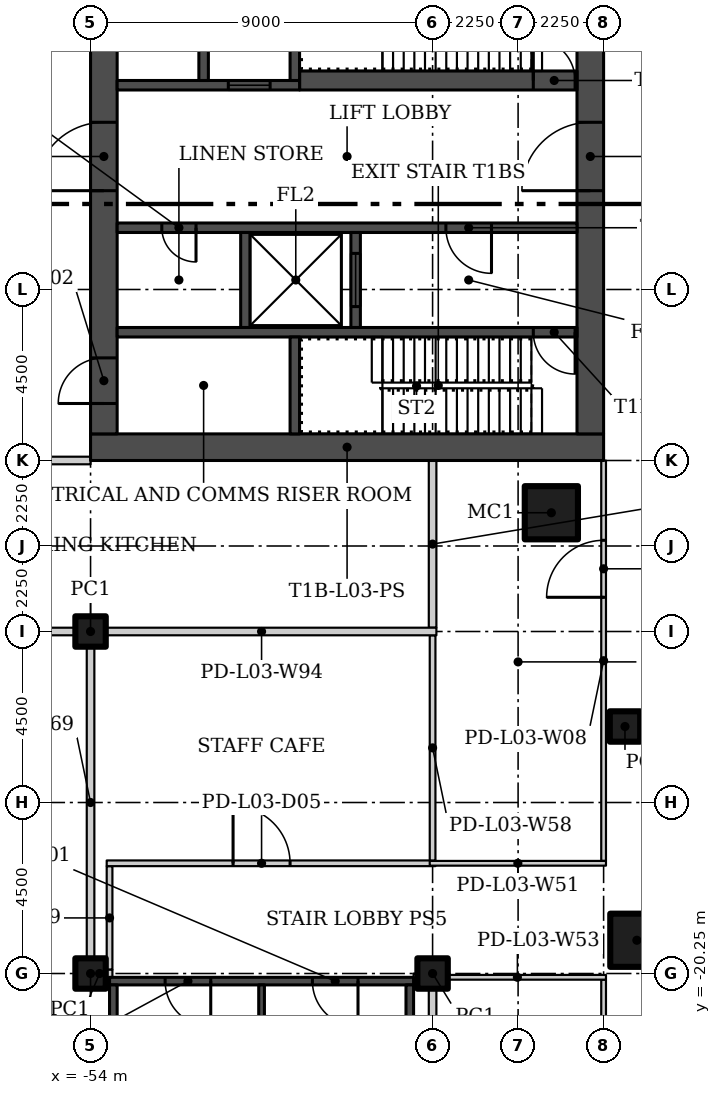
"""IFC4 building model, lengths in metres.
Left out: names, types, materials, properties, quantities, classifications, styles, units other than length and angle.
Written with IfcOpenShell. Run it as: python <this file> out.ifc"""

import sys

from ifc_helpers import new_model, si_unit, direction, frame, frame_2d, origin, origin_2d, place, context, subcontext, project, spatial, rectangle, hollow_rectangle, extrude, element, fill, save


model = new_model("IFC4")
c1 = context("Model", 3, precision=1e-05, world=origin(), true_north=direction((0.0, 1.0)))
c2 = subcontext(c1, "Body", "Model", "MODEL_VIEW")
j1 = project(units=[si_unit("LENGTHUNIT", "METRE"), si_unit("PLANEANGLEUNIT", "RADIAN")], contexts=[c1])
p1 = place(None, origin())
s1 = spatial("IfcSite", under=j1, at=p1, CompositionType="ELEMENT")
p2 = place(p1, origin())
s2 = spatial("IfcBuilding", under=s1, at=p2, CompositionType="ELEMENT")
p3 = place(p2, frame((0.0, 0.0, 18.5)))
s3 = spatial("IfcBuildingStorey", under=s2, at=p3, CompositionType="ELEMENT", Elevation=18.5)
p4 = place(p3, frame((-41.875, -8.125, 0.0)))
e1 = element("IfcColumn", 1, at=p4, inside=s3, PredefinedType="COLUMN", context=c2, shape_type="SweptSolid", body=[
    extrude(hollow_rectangle(XDim=1.4, YDim=1.4, WallThickness=0.06, at=origin_2d()), origin(), (0.0, 0.0, 1.0), 4.6),
])
p5 = place(p3, frame((-39.938, -13.75, 0.0)))
e2 = element("IfcColumn", 2, at=p5, inside=s3, PredefinedType="COLUMN", context=c2, shape_type="SweptSolid", body=[
    extrude(hollow_rectangle(XDim=0.8, YDim=0.8, WallThickness=0.03, at=origin_2d()), origin(), (0.0, 0.0, 1.0), 4.6),
])
p6 = place(p3, frame((-39.625, -19.375, 0.0)))
e3 = element("IfcColumn", 3, at=p6, inside=s3, PredefinedType="COLUMN", context=c2, shape_type="SweptSolid", body=[
    extrude(hollow_rectangle(XDim=1.4, YDim=1.4, WallThickness=0.06, at=origin_2d()), origin(), (0.0, 0.0, 1.0), 4.6),
])
for number, where in (
    (4, (-54.0, -20.25, 0.0)),
    (5, (-54.0, -11.25, 0.0)),
    (6, (-45.0, -20.25, 0.0)),
):
    element("IfcColumn", number, at=place(p3, frame(where)), inside=s3, PredefinedType="COLUMN", context=c2, shape_type="SweptSolid", body=[
        extrude(hollow_rectangle(XDim=0.8, YDim=0.8, WallThickness=0.03, at=origin_2d()), origin(), (0.0, 0.0, 1.0), 4.6),
    ])
p7 = place(p3, frame((-40.5, -29.175, 0.0), z_axis=(0.0, 0.0, 1.0), x_axis=(0.0, 1.0, 0.0)))
e7 = element("IfcWall", 7, at=p7, inside=s3, PredefinedType="PARTITIONING", context=c2, shape_type="SweptSolid", body=[
    extrude(rectangle(XDim=8.763, YDim=0.125, at=frame_2d((4.381, 0.0))), origin(), (0.0, 0.0, 1.0), 4.6),
])
p8 = place(p7, frame((3.625, 0.0, 0.0)))
e8 = element("IfcOpeningElement", 8, at=p8, cuts=e7, PredefinedType="OPENING", context=c2, shape_type="SweptSolid", body=[
    extrude(rectangle(XDim=0.9, YDim=2.1, at=frame_2d((0.45, 1.05))), frame((0.0, 0.073, 0.0), z_axis=(0.0, -1.0, 0.0), x_axis=(1.0, 0.0, 0.0)), (0.0, 0.0, 1.0), 0.145),
])
p9 = place(p3, frame((-40.5, -17.287, 0.0), z_axis=(0.0, 0.0, 1.0), x_axis=(0.0, 1.0, 0.0)))
e9 = element("IfcWall", 9, at=p9, inside=s3, PredefinedType="PARTITIONING", context=c2, shape_type="SweptSolid", body=[
    extrude(rectangle(XDim=10.537, YDim=0.125, at=frame_2d((5.269, 0.0))), origin(), (0.0, 0.0, 1.0), 4.6),
])
p10 = place(p9, frame((6.937, 0.0, 0.0)))
e10 = element("IfcOpeningElement", 10, at=p10, cuts=e9, PredefinedType="OPENING", context=c2, shape_type="SweptSolid", body=[
    extrude(rectangle(XDim=1.5, YDim=2.1, at=frame_2d((0.75, 1.05))), frame((0.0, 0.073, 0.0), z_axis=(0.0, -1.0, 0.0), x_axis=(1.0, 0.0, 0.0)), (0.0, 0.0, 1.0), 0.145),
])
p11 = place(p3, frame((-54.0, -6.75, 0.0), z_axis=(0.0, 0.0, 1.0), x_axis=(-1.0, 0.0, 0.0)))
e11 = element("IfcWall", 11, at=p11, inside=s3, PredefinedType="PARTITIONING", context=c2, shape_type="SweptSolid", body=[
    extrude(rectangle(XDim=11.155, YDim=0.2, at=frame_2d((5.578, 0.0))), origin(), (0.0, 0.0, 1.0), 4.6),
])
p12 = place(p11, frame((4.35, 0.0, 0.0)))
e12 = element("IfcOpeningElement", 12, at=p12, cuts=e11, PredefinedType="OPENING", context=c2, shape_type="SweptSolid", body=[
    extrude(rectangle(XDim=1.5, YDim=2.4, at=frame_2d((0.75, 1.2))), frame((0.0, 0.11, 0.0), z_axis=(0.0, -1.0, 0.0), x_axis=(1.0, 0.0, 0.0)), (0.0, 0.0, 1.0), 0.22),
])
p13 = place(p11, frame((9.375, 0.0, 0.0)))
e13 = element("IfcOpeningElement", 13, at=p13, cuts=e11, PredefinedType="OPENING", context=c2, shape_type="SweptSolid", body=[
    extrude(rectangle(XDim=1.5, YDim=2.4, at=frame_2d((0.75, 1.2))), frame((0.0, 0.11, 0.0), z_axis=(0.0, -1.0, 0.0), x_axis=(1.0, 0.0, 0.0)), (0.0, 0.0, 1.0), 0.22),
])
p14 = place(p3, frame((-44.9, -20.35, 0.0), z_axis=(0.0, 0.0, 1.0), x_axis=(-1.0, 0.0, 0.0)))
e14 = element("IfcWall", 14, at=p14, inside=s3, PredefinedType="PARTITIONING", context=c2, shape_type="SweptSolid", body=[
    extrude(rectangle(XDim=0.6, YDim=0.2, at=frame_2d((0.3, 0.0))), origin(), (0.0, 0.0, 1.0), 4.6),
])
p15 = place(p3, frame((-53.5, -20.15, 0.0), z_axis=(0.0, 0.0, 1.0), x_axis=(0.0, 1.0, 0.0)))
e15 = element("IfcWall", 15, at=p15, inside=s3, PredefinedType="PARTITIONING", context=c2, shape_type="SweptSolid", body=[
    extrude(rectangle(XDim=2.725, YDim=0.15, at=frame_2d((1.363, 0.0))), origin(), (0.0, 0.0, 1.0), 4.6),
])
p16 = place(p3, frame((-53.575, -17.35, 0.0)))
e16 = element("IfcWall", 16, at=p16, inside=s3, PredefinedType="PARTITIONING", context=c2, shape_type="SweptSolid", body=[
    extrude(rectangle(XDim=8.65, YDim=0.15, at=frame_2d((4.325, 0.0))), origin(), (0.0, 0.0, 1.0), 4.6),
])
p17 = place(p16, frame((3.325, 0.0, 0.0)))
e17 = element("IfcOpeningElement", 17, at=p17, cuts=e16, PredefinedType="OPENING", context=c2, shape_type="SweptSolid", body=[
    extrude(rectangle(XDim=1.5, YDim=2.1, at=frame_2d((0.75, 1.05))), frame((0.0, 0.085, 0.0), z_axis=(0.0, -1.0, 0.0), x_axis=(1.0, 0.0, 0.0)), (0.0, 0.0, 1.0), 0.17),
])
p18 = place(p3, frame((-45.075, -17.35, 0.0)))
e18 = element("IfcWall", 18, at=p18, inside=s3, PredefinedType="PARTITIONING", context=c2, shape_type="SweptSolid", body=[
    extrude(rectangle(XDim=4.637, YDim=0.125, at=frame_2d((2.319, 0.0))), origin(), (0.0, 0.0, 1.0), 4.6),
])
p19 = place(p3, frame((-40.438, -20.35, 0.0), z_axis=(0.0, 0.0, 1.0), x_axis=(-1.0, 0.0, 0.0)))
e19 = element("IfcWall", 19, at=p19, inside=s3, PredefinedType="PARTITIONING", context=c2, shape_type="SweptSolid", body=[
    extrude(rectangle(XDim=4.663, YDim=0.125, at=frame_2d((2.331, 0.0))), origin(), (0.0, 0.0, 1.0), 4.6),
])
p20 = place(p3, frame((-45.0, -17.275, 0.0), z_axis=(0.0, 0.0, 1.0), x_axis=(0.0, 1.0, 0.0)))
e20 = element("IfcWall", 20, at=p20, inside=s3, PredefinedType="PARTITIONING", context=c2, shape_type="SweptSolid", body=[
    extrude(rectangle(XDim=5.925, YDim=0.15, at=frame_2d((2.962, 0.0))), origin(), (0.0, 0.0, 1.0), 4.6),
])
p21 = place(p3, frame((-53.9, -11.25, 0.0), z_axis=(0.0, 0.0, 1.0), x_axis=(-1.0, 0.0, 0.0)))
e21 = element("IfcWall", 21, at=p21, inside=s3, PredefinedType="PARTITIONING", context=c2, shape_type="SweptSolid", body=[
    extrude(rectangle(XDim=9.2, YDim=0.2, at=frame_2d((4.6, 0.0))), origin(), (0.0, 0.0, 1.0), 4.6),
])
p22 = place(p3, frame((-54.0, -20.15, 0.0), z_axis=(0.0, 0.0, 1.0), x_axis=(0.0, 1.0, 0.0)))
e22 = element("IfcWall", 22, at=p22, inside=s3, PredefinedType="PARTITIONING", context=c2, shape_type="SweptSolid", body=[
    extrude(rectangle(XDim=8.8, YDim=0.2, at=frame_2d((4.4, 0.0))), origin(), (0.0, 0.0, 1.0), 4.6),
])
p23 = place(p3, frame((-53.425, -20.25, 0.0), z_axis=(0.0, 0.0, 1.0), x_axis=(-1.0, 0.0, 0.0)))
e23 = element("IfcWall", 23, at=p23, inside=s3, PredefinedType="PARTITIONING", context=c2, shape_type="SweptSolid", body=[
    extrude(rectangle(XDim=0.675, YDim=0.2, at=frame_2d((0.337, 0.0))), origin(), (0.0, 0.0, 1.0), 4.6),
])
p24 = place(p3, frame((-45.0, -29.15, 0.0), z_axis=(0.0, 0.0, 1.0), x_axis=(0.0, 1.0, 0.0)))
e24 = element("IfcWall", 24, at=p24, inside=s3, PredefinedType="PARTITIONING", context=c2, shape_type="SweptSolid", body=[
    extrude(rectangle(XDim=8.7, YDim=0.2, at=frame_2d((4.35, 0.0))), origin(), (0.0, 0.0, 1.0), 4.6),
])
p25 = place(p3, frame((-45.0, -11.15, 0.0), z_axis=(0.0, 0.0, 1.0), x_axis=(0.0, 1.0, 0.0)))
e25 = element("IfcWall", 25, at=p25, inside=s3, PredefinedType="PARTITIONING", context=c2, shape_type="SweptSolid", body=[
    extrude(rectangle(XDim=4.4, YDim=0.2, at=frame_2d((2.2, 0.0))), origin(), (0.0, 0.0, 1.0), 4.6),
])
p26 = place(p3, frame((-54.1, -11.25, 0.0)))
e26 = element("IfcWall", 26, at=p26, inside=s3, PredefinedType="PARTITIONING", context=c2, shape_type="SweptSolid", body=[
    extrude(rectangle(XDim=9.2, YDim=0.2, at=frame_2d((4.6, 0.0))), origin(), (0.0, 0.0, 1.0), 4.6),
])
p27 = place(p3, frame((-40.5, -6.4, 0.0), z_axis=(0.0, 0.0, 1.0), x_axis=(-1.0, 0.0, 0.0)))
e27 = element("IfcWall", 27, at=p27, inside=s3, PredefinedType="SHEAR", context=c2, shape_type="SweptSolid", body=[
    extrude(rectangle(XDim=13.5, YDim=0.7, at=frame_2d((6.75, 0.0))), origin(), (0.0, 0.0, 1.0), 4.6),
])
p28 = place(p3, frame((-40.85, -6.05, 0.0), z_axis=(0.0, 0.0, 1.0), x_axis=(0.0, 1.0, 0.0)))
e28 = element("IfcWall", 28, at=p28, inside=s3, PredefinedType="SHEAR", context=c2, shape_type="SweptSolid", body=[
    extrude(rectangle(XDim=12.1, YDim=0.7, at=frame_2d((6.05, 0.0))), origin(), (0.0, 0.0, 1.0), 4.6),
])
p29 = place(p28, frame((6.4, 0.0, 0.0)))
e29 = element("IfcOpeningElement", 29, at=p29, cuts=e28, PredefinedType="OPENING", context=c2, shape_type="SweptSolid", body=[
    extrude(rectangle(XDim=1.8, YDim=2.4, at=frame_2d((0.9, 1.2))), frame((0.0, 0.36, 0.0), z_axis=(0.0, -1.0, 0.0), x_axis=(1.0, 0.0, 0.0)), (0.0, 0.0, 1.0), 0.72),
])
p30 = place(p3, frame((-53.65, -6.05, 0.0), z_axis=(0.0, 0.0, 1.0), x_axis=(0.0, 1.0, 0.0)))
e30 = element("IfcWall", 30, at=p30, inside=s3, PredefinedType="SHEAR", context=c2, shape_type="SweptSolid", body=[
    extrude(rectangle(XDim=12.1, YDim=0.7, at=frame_2d((6.05, 0.0))), origin(), (0.0, 0.0, 1.0), 4.6),
])
p31 = place(p30, frame((0.8, 0.0, 0.0)))
e31 = element("IfcOpeningElement", 31, at=p31, cuts=e30, PredefinedType="OPENING", context=c2, shape_type="SweptSolid", body=[
    extrude(rectangle(XDim=1.2, YDim=2.1, at=frame_2d((0.6, 1.05))), frame((0.0, 0.36, 0.0), z_axis=(0.0, -1.0, 0.0), x_axis=(1.0, 0.0, 0.0)), (0.0, 0.0, 1.0), 0.72),
])
p32 = place(p30, frame((6.4, 0.0, 0.0)))
e32 = element("IfcOpeningElement", 32, at=p32, cuts=e30, PredefinedType="OPENING", context=c2, shape_type="SweptSolid", body=[
    extrude(rectangle(XDim=1.8, YDim=2.4, at=frame_2d((0.9, 1.2))), frame((0.0, 0.36, 0.0), z_axis=(0.0, -1.0, 0.0), x_axis=(1.0, 0.0, 0.0)), (0.0, 0.0, 1.0), 0.72),
])
p33 = place(p3, frame((-41.2, -3.375, 0.0), z_axis=(0.0, 0.0, 1.0), x_axis=(-1.0, 0.0, 0.0)))
e33 = element("IfcWall", 33, at=p33, inside=s3, PredefinedType="SHEAR", context=c2, shape_type="SweptSolid", body=[
    extrude(rectangle(XDim=12.1, YDim=0.25, at=frame_2d((6.05, 0.0))), origin(), (0.0, 0.0, 1.0), 4.6),
])
p34 = place(p33, frame((0.05, 0.0, 0.0)))
e34 = element("IfcOpeningElement", 34, at=p34, cuts=e33, PredefinedType="OPENING", context=c2, shape_type="SweptSolid", body=[
    extrude(rectangle(XDim=1.1, YDim=2.1, at=frame_2d((0.55, 1.05))), frame((0.0, 0.135, 0.0), z_axis=(0.0, -1.0, 0.0), x_axis=(1.0, 0.0, 0.0)), (0.0, 0.0, 1.0), 0.27),
])
p35 = place(p3, frame((-48.625, -6.05, 0.0), z_axis=(0.0, 0.0, 1.0), x_axis=(0.0, 1.0, 0.0)))
e35 = element("IfcWall", 35, at=p35, inside=s3, PredefinedType="SHEAR", context=c2, shape_type="SweptSolid", body=[
    extrude(rectangle(XDim=2.55, YDim=0.25, at=frame_2d((1.275, 0.0))), origin(), (0.0, 0.0, 1.0), 4.6),
])
p36 = place(p3, frame((-41.2, -0.625, 0.0), z_axis=(0.0, 0.0, 1.0), x_axis=(-1.0, 0.0, 0.0)))
e36 = element("IfcWall", 36, at=p36, inside=s3, PredefinedType="SHEAR", context=c2, shape_type="SweptSolid", body=[
    extrude(rectangle(XDim=12.1, YDim=0.25, at=frame_2d((6.05, 0.0))), origin(), (0.0, 0.0, 1.0), 4.6),
])
p37 = place(p36, frame((2.25, 0.0, 0.0)))
e37 = element("IfcOpeningElement", 37, at=p37, cuts=e36, PredefinedType="OPENING", context=c2, shape_type="SweptSolid", body=[
    extrude(rectangle(XDim=1.2, YDim=2.1, at=frame_2d((0.6, 1.05))), frame((0.0, 0.135, 0.0), z_axis=(0.0, -1.0, 0.0), x_axis=(1.0, 0.0, 0.0)), (0.0, 0.0, 1.0), 0.27),
])
p38 = place(p36, frame((10.025, 0.0, 0.0)))
e38 = element("IfcOpeningElement", 38, at=p38, cuts=e36, PredefinedType="OPENING", context=c2, shape_type="SweptSolid", body=[
    extrude(rectangle(XDim=0.9, YDim=2.1, at=frame_2d((0.45, 1.05))), frame((0.0, 0.135, 0.0), z_axis=(0.0, -1.0, 0.0), x_axis=(1.0, 0.0, 0.0)), (0.0, 0.0, 1.0), 0.27),
])
p39 = place(p3, frame((-47.025, -3.25, 0.0), z_axis=(0.0, 0.0, 1.0), x_axis=(0.0, 1.0, 0.0)))
e39 = element("IfcWall", 39, at=p39, inside=s3, PredefinedType="SHEAR", context=c2, shape_type="SweptSolid", body=[
    extrude(rectangle(XDim=2.5, YDim=0.25, at=frame_2d((1.25, 0.0))), origin(), (0.0, 0.0, 1.0), 4.6),
])
p40 = place(p39, frame((0.55, 0.0, 0.0)))
e40 = element("IfcOpeningElement", 40, at=p40, cuts=e39, PredefinedType="OPENING", context=c2, shape_type="SweptSolid", body=[
    extrude(rectangle(XDim=1.4, YDim=2.4, at=frame_2d((0.7, 1.2))), frame((0.0, 0.135, 0.0), z_axis=(0.0, -1.0, 0.0), x_axis=(1.0, 0.0, 0.0)), (0.0, 0.0, 1.0), 0.27),
])
p41 = place(p3, frame((-49.925, -3.25, 0.0), z_axis=(0.0, 0.0, 1.0), x_axis=(0.0, 1.0, 0.0)))
e41 = element("IfcWall", 41, at=p41, inside=s3, PredefinedType="SHEAR", context=c2, shape_type="SweptSolid", body=[
    extrude(rectangle(XDim=2.5, YDim=0.25, at=frame_2d((1.25, 0.0))), origin(), (0.0, 0.0, 1.0), 4.6),
])
p42 = place(p3, frame((-48.5, 3.25, 0.0)))
e42 = element("IfcWall", 42, at=p42, inside=s3, PredefinedType="SHEAR", context=c2, shape_type="SweptSolid", body=[
    extrude(rectangle(XDim=7.3, YDim=0.5, at=frame_2d((3.65, 0.0))), origin(), (0.0, 0.0, 1.0), 4.6),
])
p43 = place(p42, frame((6.15, 0.0, 0.0)))
e43 = element("IfcOpeningElement", 43, at=p43, cuts=e42, PredefinedType="OPENING", context=c2, shape_type="SweptSolid", body=[
    extrude(rectangle(XDim=1.1, YDim=2.1, at=frame_2d((0.55, 1.05))), frame((0.0, 0.26, 0.0), z_axis=(0.0, -1.0, 0.0), x_axis=(1.0, 0.0, 0.0)), (0.0, 0.0, 1.0), 0.52),
])
p44 = place(p3, frame((-48.5, 3.125, 0.0), z_axis=(0.0, 0.0, 1.0), x_axis=(-1.0, 0.0, 0.0)))
e44 = element("IfcWall", 44, at=p44, inside=s3, PredefinedType="SHEAR", context=c2, shape_type="SweptSolid", body=[
    extrude(rectangle(XDim=4.8, YDim=0.25, at=frame_2d((2.4, 0.0))), origin(), (0.0, 0.0, 1.0), 4.6),
])
p45 = place(p44, frame((0.775, 0.0, 0.0)))
e45 = element("IfcOpeningElement", 45, at=p45, cuts=e44, PredefinedType="OPENING", context=c2, shape_type="SweptSolid", body=[
    extrude(rectangle(XDim=1.1, YDim=2.1, at=frame_2d((0.55, 1.05))), frame((0.0, 0.135, 0.0), z_axis=(0.0, -1.0, 0.0), x_axis=(1.0, 0.0, 0.0)), (0.0, 0.0, 1.0), 0.27),
])
for number, where, z_axis, x_axis in (
    (46, (-48.625, 3.25, 0.0), (0.0, 0.0, 1.0), (0.0, 1.0, 0.0)),
    (47, (-51.025, 3.25, 0.0), (0.0, 0.0, 1.0), (0.0, 1.0, 0.0)),
):
    element("IfcWall", number, at=place(p3, frame(where, z_axis=z_axis, x_axis=x_axis)), inside=s3, PredefinedType="SHEAR", context=c2, shape_type="SweptSolid", body=[
        extrude(rectangle(XDim=2.8, YDim=0.25, at=frame_2d((1.4, 0.0))), origin(), (0.0, 0.0, 1.0), 4.6),
    ])
p46 = place(p3, frame((-45.5, -20.45, 0.0), z_axis=(0.0, 0.0, 1.0), x_axis=(-1.0, 0.0, 0.0)))
e48 = element("IfcWall", 48, at=p46, inside=s3, PredefinedType="SHEAR", context=c2, shape_type="SweptSolid", body=[
    extrude(rectangle(XDim=8.0, YDim=0.2, at=frame_2d((4.0, 0.0))), origin(), (0.0, 0.0, 1.0), 4.6),
])
p47 = place(p46, frame((5.337, 0.0, 0.0)))
e49 = element("IfcOpeningElement", 49, at=p47, cuts=e48, PredefinedType="OPENING", context=c2, shape_type="SweptSolid", body=[
    extrude(rectangle(XDim=1.2, YDim=2.4, at=frame_2d((0.6, 1.2))), frame((0.0, 0.11, 0.0), z_axis=(0.0, -1.0, 0.0), x_axis=(1.0, 0.0, 0.0)), (0.0, 0.0, 1.0), 0.22),
])
p48 = place(p46, frame((1.462, 0.0, 0.0)))
e50 = element("IfcOpeningElement", 50, at=p48, cuts=e48, PredefinedType="OPENING", context=c2, shape_type="SweptSolid", body=[
    extrude(rectangle(XDim=1.2, YDim=2.4, at=frame_2d((0.6, 1.2))), frame((0.0, 0.11, 0.0), z_axis=(0.0, -1.0, 0.0), x_axis=(1.0, 0.0, 0.0)), (0.0, 0.0, 1.0), 0.22),
])
for number, where, z_axis, x_axis in (
    (51, (-53.4, -28.95, 0.0), (0.0, 0.0, 1.0), (0.0, 1.0, 0.0)),
    (52, (-45.6, -28.95, 0.0), (0.0, 0.0, 1.0), (0.0, 1.0, 0.0)),
):
    element("IfcWall", number, at=place(p3, frame(where, z_axis=z_axis, x_axis=x_axis)), inside=s3, PredefinedType="SHEAR", context=c2, shape_type="SweptSolid", body=[
        extrude(rectangle(XDim=8.4, YDim=0.2, at=frame_2d((4.2, 0.0))), origin(), (0.0, 0.0, 1.0), 4.6),
    ])
p49 = place(p3, frame((-49.5, -28.95, 0.0), z_axis=(0.0, 0.0, 1.0), x_axis=(0.0, 1.0, 0.0)))
e53 = element("IfcWall", 53, at=p49, inside=s3, PredefinedType="SHEAR", context=c2, shape_type="SweptSolid", body=[
    extrude(rectangle(XDim=8.4, YDim=0.15, at=frame_2d((4.2, 0.0))), origin(), (0.0, 0.0, 1.0), 4.6),
])
p50 = place(p17, origin())
e54 = element("IfcDoor", 54, at=p50, inside=s3, OperationType="DOUBLE_DOOR_SINGLE_SWING", PredefinedType="DOOR", context=c2, shape_type="SweptSolid", body=[
    extrude(rectangle(XDim=1.5, YDim=2.1, at=frame_2d((0.75, 1.05))), frame((0.0, 0.025, 0.0), z_axis=(0.0, -1.0, 0.0), x_axis=(1.0, 0.0, 0.0)), (0.0, 0.0, 1.0), 0.05),
])
fill(e17, e54)
p51 = place(p10, origin())
e55 = element("IfcDoor", 55, at=p51, inside=s3, OperationType="DOUBLE_DOOR_SINGLE_SWING", PredefinedType="DOOR", context=c2, shape_type="SweptSolid", body=[
    extrude(rectangle(XDim=1.5, YDim=2.1, at=frame_2d((0.75, 1.05))), frame((0.0, 0.025, 0.0), z_axis=(0.0, -1.0, 0.0), x_axis=(1.0, 0.0, 0.0)), (0.0, 0.0, 1.0), 0.05),
])
fill(e10, e55)
p52 = place(p29, origin())
e56 = element("IfcDoor", 56, at=p52, inside=s3, OperationType="DOUBLE_DOOR_SINGLE_SWING", PredefinedType="DOOR", context=c2, shape_type="SweptSolid", body=[
    extrude(rectangle(XDim=1.8, YDim=2.4, at=frame_2d((0.9, 1.2))), frame((0.0, 0.025, 0.0), z_axis=(0.0, -1.0, 0.0), x_axis=(1.0, 0.0, 0.0)), (0.0, 0.0, 1.0), 0.05),
])
fill(e29, e56)
p53 = place(p31, origin())
e57 = element("IfcDoor", 57, at=p53, inside=s3, OperationType="SINGLE_SWING_LEFT", PredefinedType="DOOR", context=c2, shape_type="SweptSolid", body=[
    extrude(rectangle(XDim=1.2, YDim=2.1, at=frame_2d((0.6, 1.05))), frame((0.0, 0.025, 0.0), z_axis=(0.0, -1.0, 0.0), x_axis=(1.0, 0.0, 0.0)), (0.0, 0.0, 1.0), 0.05),
])
fill(e31, e57)
p54 = place(p32, origin())
e58 = element("IfcDoor", 58, at=p54, inside=s3, OperationType="DOUBLE_DOOR_SINGLE_SWING", PredefinedType="DOOR", context=c2, shape_type="SweptSolid", body=[
    extrude(rectangle(XDim=1.8, YDim=2.4, at=frame_2d((0.9, 1.2))), frame((0.0, 0.025, 0.0), z_axis=(0.0, -1.0, 0.0), x_axis=(1.0, 0.0, 0.0)), (0.0, 0.0, 1.0), 0.05),
])
fill(e32, e58)
p55 = place(p34, origin())
e59 = element("IfcDoor", 59, at=p55, inside=s3, OperationType="SINGLE_SWING_LEFT", PredefinedType="DOOR", context=c2, shape_type="SweptSolid", body=[
    extrude(rectangle(XDim=1.1, YDim=2.1, at=frame_2d((0.55, 1.05))), frame((0.0, 0.025, 0.0), z_axis=(0.0, -1.0, 0.0), x_axis=(1.0, 0.0, 0.0)), (0.0, 0.0, 1.0), 0.05),
])
fill(e34, e59)
p56 = place(p37, origin())
e60 = element("IfcDoor", 60, at=p56, inside=s3, OperationType="SINGLE_SWING_LEFT", PredefinedType="DOOR", context=c2, shape_type="SweptSolid", body=[
    extrude(rectangle(XDim=1.2, YDim=2.1, at=frame_2d((0.6, 1.05))), frame((0.0, 0.025, 0.0), z_axis=(0.0, -1.0, 0.0), x_axis=(1.0, 0.0, 0.0)), (0.0, 0.0, 1.0), 0.05),
])
fill(e37, e60)
p57 = place(p38, origin())
e61 = element("IfcDoor", 61, at=p57, inside=s3, OperationType="SINGLE_SWING_RIGHT", PredefinedType="DOOR", context=c2, shape_type="SweptSolid", body=[
    extrude(rectangle(XDim=0.9, YDim=2.1, at=frame_2d((0.45, 1.05))), frame((0.0, 0.025, 0.0), z_axis=(0.0, -1.0, 0.0), x_axis=(1.0, 0.0, 0.0)), (0.0, 0.0, 1.0), 0.05),
])
fill(e38, e61)
p58 = place(p40, origin())
e62 = element("IfcDoor", 62, at=p58, inside=s3, OperationType="SLIDING_TO_LEFT", PredefinedType="DOOR", context=c2, shape_type="SweptSolid", body=[
    extrude(rectangle(XDim=1.4, YDim=2.4, at=frame_2d((0.7, 1.2))), frame((0.0, 0.025, 0.0), z_axis=(0.0, -1.0, 0.0), x_axis=(1.0, 0.0, 0.0)), (0.0, 0.0, 1.0), 0.05),
])
fill(e40, e62)
p59 = place(p43, origin())
e63 = element("IfcDoor", 63, at=p59, inside=s3, OperationType="SINGLE_SWING_RIGHT", PredefinedType="DOOR", context=c2, shape_type="SweptSolid", body=[
    extrude(rectangle(XDim=1.1, YDim=2.1, at=frame_2d((0.55, 1.05))), frame((0.0, 0.025, 0.0), z_axis=(0.0, -1.0, 0.0), x_axis=(1.0, 0.0, 0.0)), (0.0, 0.0, 1.0), 0.05),
])
fill(e43, e63)
p60 = place(p45, origin())
e64 = element("IfcDoor", 64, at=p60, inside=s3, OperationType="SLIDING_TO_LEFT", PredefinedType="DOOR", context=c2, shape_type="SweptSolid", body=[
    extrude(rectangle(XDim=1.1, YDim=2.1, at=frame_2d((0.55, 1.05))), frame((0.0, 0.025, 0.0), z_axis=(0.0, -1.0, 0.0), x_axis=(1.0, 0.0, 0.0)), (0.0, 0.0, 1.0), 0.05),
])
fill(e45, e64)
p61 = place(p47, origin())
e65 = element("IfcDoor", 65, at=p61, inside=s3, OperationType="SINGLE_SWING_LEFT", PredefinedType="DOOR", context=c2, shape_type="SweptSolid", body=[
    extrude(rectangle(XDim=1.2, YDim=2.4, at=frame_2d((0.6, 1.2))), frame((0.0, 0.025, 0.0), z_axis=(0.0, -1.0, 0.0), x_axis=(1.0, 0.0, 0.0)), (0.0, 0.0, 1.0), 0.05),
])
fill(e49, e65)
p62 = place(p48, origin())
e66 = element("IfcDoor", 66, at=p62, inside=s3, OperationType="SINGLE_SWING_RIGHT", PredefinedType="DOOR", context=c2, shape_type="SweptSolid", body=[
    extrude(rectangle(XDim=1.2, YDim=2.4, at=frame_2d((0.6, 1.2))), frame((0.0, 0.025, 0.0), z_axis=(0.0, -1.0, 0.0), x_axis=(1.0, 0.0, 0.0)), (0.0, 0.0, 1.0), 0.05),
])
fill(e50, e66)
save(model, sys.argv[1])
